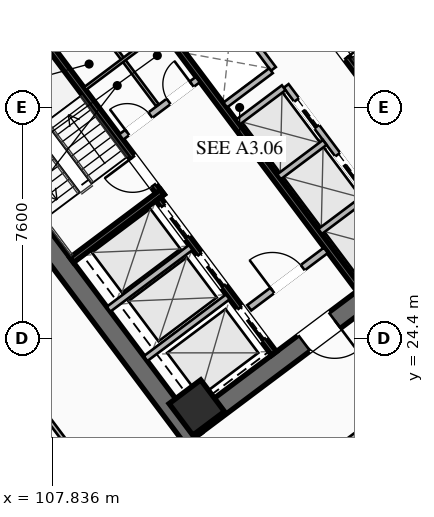
"""IFC4 building model, lengths in metres.
Left out: names, types, materials, properties, quantities, classifications, styles, units other than length and angle.
Written with IfcOpenShell. Run it as: python <this file> out.ifc"""

import sys

from ifc_helpers import new_model, si_unit, direction, frame, frame_2d, origin, origin_2d, place, context, subcontext, project, spatial, rectangle, hollow_rectangle, extrude, element, fill, save


model = new_model("IFC4")
c1 = context("Model", 3, precision=1e-05, world=origin(), true_north=direction((0.0, 1.0)))
c2 = subcontext(c1, "Body", "Model", "MODEL_VIEW")
j1 = project(units=[si_unit("LENGTHUNIT", "METRE"), si_unit("PLANEANGLEUNIT", "RADIAN")], contexts=[c1])
p1 = place(None, origin())
s1 = spatial("IfcSite", under=j1, at=p1, CompositionType="ELEMENT")
p2 = place(p1, origin())
s2 = spatial("IfcBuilding", under=s1, at=p2, CompositionType="ELEMENT")
p3 = place(p2, frame((0.0, 0.0, 31.7)))
s3 = spatial("IfcBuildingStorey", under=s2, at=p3, CompositionType="ELEMENT", Elevation=31.7)
for number, where, z_axis, x_axis in (
    (1, (112.476, 21.107, 0.0), (0.0, 0.0, 1.0), (-0.6, 0.8, 0.0)),
    (2, (115.524, 42.893, 0.0), (0.0, 0.0, 1.0), (0.6, -0.8, 0.0)),
):
    element("IfcWall", number, at=place(p3, frame(where, z_axis=z_axis, x_axis=x_axis)), inside=s3, PredefinedType="SHEAR", context=c2, shape_type="SweptSolid", body=[
        extrude(rectangle(XDim=15.6, YDim=0.65, at=frame_2d((7.8, 0.0))), origin(), (0.0, 0.0, 1.0), 3.55),
    ])
p4 = place(p3, frame((124.429, 30.478, 0.0), z_axis=(0.0, 0.0, 1.0), x_axis=(-0.799998028465, -0.600002628705, 0.0)))
e3 = element("IfcWall", 3, at=p4, inside=s3, PredefinedType="SHEAR", context=c2, shape_type="SweptSolid", body=[
    extrude(rectangle(XDim=14.86, YDim=0.65, at=frame_2d((7.43, 0.0))), origin(), (0.0, 0.0, 1.0), 3.55),
])
p5 = place(p4, frame((9.13, 0.0, 0.0)))
e4 = element("IfcOpeningElement", 4, at=p5, cuts=e3, PredefinedType="OPENING", context=c2, shape_type="SweptSolid", body=[
    extrude(rectangle(XDim=1.25, YDim=2.25, at=frame_2d((0.625, 1.125))), frame((0.0, 0.335, 0.0), z_axis=(0.0, -1.0, 0.0), x_axis=(1.0, 0.0, 0.0)), (0.0, 0.0, 1.0), 0.67),
])
p6 = place(p4, frame((4.08, 0.0, 0.0)))
e5 = element("IfcOpeningElement", 5, at=p6, cuts=e3, PredefinedType="OPENING", context=c2, shape_type="SweptSolid", body=[
    extrude(rectangle(XDim=1.25, YDim=2.25, at=frame_2d((0.625, 1.125))), frame((0.0, 0.335, 0.0), z_axis=(0.0, -1.0, 0.0), x_axis=(1.0, 0.0, 0.0)), (0.0, 0.0, 1.0), 0.67),
])
p7 = place(p3, frame((103.571, 33.522, 0.0), z_axis=(0.0, 0.0, 1.0), x_axis=(0.799998028465, 0.600002628705, 0.0)))
e6 = element("IfcWall", 6, at=p7, inside=s3, PredefinedType="SHEAR", context=c2, shape_type="SweptSolid", body=[
    extrude(rectangle(XDim=14.86, YDim=0.65, at=frame_2d((7.43, 0.0))), origin(), (0.0, 0.0, 1.0), 3.55),
])
p8 = place(p7, frame((4.48, 0.0, 0.0)))
e7 = element("IfcOpeningElement", 7, at=p8, cuts=e6, PredefinedType="OPENING", context=c2, shape_type="SweptSolid", body=[
    extrude(rectangle(XDim=1.25, YDim=2.25, at=frame_2d((0.625, 1.125))), frame((0.0, 0.335, 0.0), z_axis=(0.0, -1.0, 0.0), x_axis=(1.0, 0.0, 0.0)), (0.0, 0.0, 1.0), 0.67),
])
p9 = place(p7, frame((9.53, 0.0, 0.0)))
e8 = element("IfcOpeningElement", 8, at=p9, cuts=e6, PredefinedType="OPENING", context=c2, shape_type="SweptSolid", body=[
    extrude(rectangle(XDim=1.25, YDim=2.25, at=frame_2d((0.625, 1.125))), frame((0.0, 0.335, 0.0), z_axis=(0.0, -1.0, 0.0), x_axis=(1.0, 0.0, 0.0)), (0.0, 0.0, 1.0), 0.67),
])
p10 = place(p3, frame((112.59, 22.13, 0.0), z_axis=(0.0, 0.0, 1.0), x_axis=(0.799999996291, 0.600000004945, 0.0)))
e9 = element("IfcColumn", 9, at=p10, inside=s3, PredefinedType="COLUMN", context=c2, shape_type="SweptSolid", body=[
    extrude(hollow_rectangle(XDim=1.3, YDim=1.3, WallThickness=0.05, at=origin_2d()), origin(), (0.0, 0.0, 1.0), 3.35),
])
p11 = place(p3, frame((111.44, 29.08, 0.0), z_axis=(0.0, 0.0, 1.0), x_axis=(-0.600009827119, 0.799992629566, 0.0)))
e10 = element("IfcWall", 10, at=p11, inside=s3, PredefinedType="SHEAR", context=c2, shape_type="SweptSolid", body=[
    extrude(rectangle(XDim=7.95, YDim=0.2, at=frame_2d((3.975, 0.0))), origin(), (0.0, 0.0, 1.0), 3.35),
])
p12 = place(p11, frame((0.45, 0.0, 0.0)))
e11 = element("IfcOpeningElement", 11, at=p12, cuts=e10, PredefinedType="OPENING", context=c2, shape_type="SweptSolid", body=[
    extrude(rectangle(XDim=1.15, YDim=2.2, at=frame_2d((0.575, 1.1))), frame((0.0, 0.11, 0.0), z_axis=(0.0, -1.0, 0.0), x_axis=(1.0, 0.0, 0.0)), (0.0, 0.0, 1.0), 0.22),
])
p13 = place(p3, frame((108.476, 26.982, 0.0), z_axis=(0.0, 0.0, 1.0), x_axis=(0.799984290658, 0.600020945218, 0.0)))
e12 = element("IfcWall", 12, at=p13, inside=s3, PredefinedType="SHEAR", context=c2, shape_type="SweptSolid", body=[
    extrude(rectangle(XDim=3.73, YDim=0.2, at=frame_2d((1.865, 0.0))), origin(), (0.0, 0.0, 1.0), 3.35),
])
p14 = place(p3, frame((116.56, 34.92, 0.0), z_axis=(0.0, 0.0, 1.0), x_axis=(0.600009827119, -0.799992629566, 0.0)))
e13 = element("IfcWall", 13, at=p14, inside=s3, PredefinedType="SHEAR", context=c2, shape_type="SweptSolid", body=[
    extrude(rectangle(XDim=7.95, YDim=0.2, at=frame_2d((3.975, 0.0))), origin(), (0.0, 0.0, 1.0), 3.35),
])
p15 = place(p14, frame((0.45, 0.0, 0.0)))
e14 = element("IfcOpeningElement", 14, at=p15, cuts=e13, PredefinedType="OPENING", context=c2, shape_type="SweptSolid", body=[
    extrude(rectangle(XDim=1.15, YDim=2.2, at=frame_2d((0.575, 1.1))), frame((0.0, 0.11, 0.0), z_axis=(0.0, -1.0, 0.0), x_axis=(1.0, 0.0, 0.0)), (0.0, 0.0, 1.0), 0.22),
])
p16 = place(p3, frame((117.938, 26.016, 0.0), z_axis=(0.0, 0.0, 1.0), x_axis=(-0.600005463273, 0.799995902516, 0.0)))
e15 = element("IfcWall", 15, at=p16, inside=s3, PredefinedType="SHEAR", context=c2, shape_type="SweptSolid", body=[
    extrude(rectangle(XDim=14.3, YDim=0.2, at=frame_2d((7.15, 0.0))), origin(), (0.0, 0.0, 1.0), 3.35),
])
p17 = place(p3, frame((110.104, 31.028, 0.0), z_axis=(0.0, 0.0, 1.0), x_axis=(0.800018601094, 0.59997519774, 0.0)))
e16 = element("IfcWall", 16, at=p17, inside=s3, PredefinedType="SOLIDWALL", context=c2, shape_type="SweptSolid", body=[
    extrude(rectangle(XDim=3.15, YDim=0.22, at=frame_2d((1.575, 0.0))), origin(), (0.0, 0.0, 1.0), 2.703),
])
p18 = place(p17, frame((0.25, 0.0, 0.0)))
e17 = element("IfcOpeningElement", 17, at=p18, cuts=e16, PredefinedType="OPENING", context=c2, shape_type="SweptSolid", body=[
    extrude(rectangle(XDim=0.95, YDim=2.05, at=frame_2d((0.475, 1.025))), frame((0.0, 0.12, 0.0), z_axis=(0.0, -1.0, 0.0), x_axis=(1.0, 0.0, 0.0)), (0.0, 0.0, 1.0), 0.24),
])
p19 = place(p17, frame((1.95, 0.0, 0.0)))
e18 = element("IfcOpeningElement", 18, at=p19, cuts=e16, PredefinedType="OPENING", context=c2, shape_type="SweptSolid", body=[
    extrude(rectangle(XDim=0.95, YDim=2.05, at=frame_2d((0.475, 1.025))), frame((0.0, 0.12, 0.0), z_axis=(0.0, -1.0, 0.0), x_axis=(1.0, 0.0, 0.0)), (0.0, 0.0, 1.0), 0.24),
])
p20 = place(p3, frame((114.316, 25.412, 0.0), z_axis=(0.0, 0.0, 1.0), x_axis=(0.800018601094, 0.59997519774, 0.0)))
e19 = element("IfcWall", 19, at=p20, inside=s3, PredefinedType="SOLIDWALL", context=c2, shape_type="SweptSolid", body=[
    extrude(rectangle(XDim=3.15, YDim=0.22, at=frame_2d((1.575, 0.0))), origin(), (0.0, 0.0, 1.0), 2.703),
])
p21 = place(p20, frame((0.95, 0.0, 0.0)))
e20 = element("IfcOpeningElement", 20, at=p21, cuts=e19, PredefinedType="OPENING", context=c2, shape_type="SweptSolid", body=[
    extrude(rectangle(XDim=1.25, YDim=2.25, at=frame_2d((0.625, 1.125))), frame((0.0, 0.12, 0.0), z_axis=(0.0, -1.0, 0.0), x_axis=(1.0, 0.0, 0.0)), (0.0, 0.0, 1.0), 0.24),
])
p22 = place(p3, frame((115.13, 23.91, 0.0), z_axis=(0.0, 0.0, 1.0), x_axis=(-0.599975393228, 0.800018454488, 0.0)))
e21 = element("IfcWall", 21, at=p22, inside=s3, PredefinedType="SHEAR", context=c2, shape_type="SweptSolid", body=[
    extrude(rectangle(XDim=6.35, YDim=0.2, at=frame_2d((3.175, 0.0))), origin(), (0.0, 0.0, 1.0), 3.35),
])
p23 = place(p22, frame((4.775, 0.0, 0.0)))
e22 = element("IfcOpeningElement", 22, at=p23, cuts=e21, PredefinedType="OPENING", context=c2, shape_type="SweptSolid", body=[
    extrude(rectangle(XDim=1.3, YDim=2.25, at=frame_2d((0.65, 1.125))), frame((0.0, 0.11, 0.0), z_axis=(0.0, -1.0, 0.0), x_axis=(1.0, 0.0, 0.0)), (0.0, 0.0, 1.0), 0.22),
])
p24 = place(p22, frame((2.775, 0.0, 0.0)))
e23 = element("IfcOpeningElement", 23, at=p24, cuts=e21, PredefinedType="OPENING", context=c2, shape_type="SweptSolid", body=[
    extrude(rectangle(XDim=1.3, YDim=2.25, at=frame_2d((0.65, 1.125))), frame((0.0, 0.11, 0.0), z_axis=(0.0, -1.0, 0.0), x_axis=(1.0, 0.0, 0.0)), (0.0, 0.0, 1.0), 0.22),
])
p25 = place(p22, frame((0.575, 0.0, 0.0)))
e24 = element("IfcOpeningElement", 24, at=p25, cuts=e21, PredefinedType="OPENING", context=c2, shape_type="SweptSolid", body=[
    extrude(rectangle(XDim=1.3, YDim=2.25, at=frame_2d((0.65, 1.125))), frame((0.0, 0.11, 0.0), z_axis=(0.0, -1.0, 0.0), x_axis=(1.0, 0.0, 0.0)), (0.0, 0.0, 1.0), 0.22),
])
for number, where, z_axis, x_axis in (
    (25, (110.906, 23.742, 0.0), (0.0, 0.0, 1.0), (0.8, 0.6, 0.0)),
    (26, (109.688, 25.366, 0.0), (0.0, 0.0, 1.0), (0.8, 0.6, 0.0)),
):
    element("IfcWall", number, at=place(p3, frame(where, z_axis=z_axis, x_axis=x_axis)), inside=s3, PredefinedType="SOLIDWALL", context=c2, shape_type="SweptSolid", body=[
        extrude(rectangle(XDim=3.38, YDim=0.2, at=frame_2d((1.69, 0.0))), origin(), (0.0, 0.0, 1.0), 3.35),
    ])
p26 = place(p3, frame((111.296, 32.072, 0.0), z_axis=(0.0, 0.0, 1.0), x_axis=(-0.59995887973, 0.800030838552, 0.0)))
e27 = element("IfcWall", 27, at=p26, inside=s3, PredefinedType="PARTITIONING", context=c2, shape_type="SweptSolid", body=[
    extrude(rectangle(XDim=3.8, YDim=0.11, at=frame_2d((1.9, 0.0))), origin(), (0.0, 0.0, 1.0), 2.703),
])
p27 = place(p3, frame((108.91, 32.62, 0.0), z_axis=(0.0, 0.0, 1.0), x_axis=(0.800018601094, 0.59997519774, 0.0)))
e28 = element("IfcWall", 28, at=p27, inside=s3, PredefinedType="PARTITIONING", context=c2, shape_type="SweptSolid", body=[
    extrude(rectangle(XDim=3.15, YDim=0.11, at=frame_2d((1.575, 0.0))), origin(), (0.0, 0.0, 1.0), 2.703),
])
p28 = place(p3, frame((119.61, 27.27, 0.0), z_axis=(0.0, 0.0, 1.0), x_axis=(-0.600011488909, 0.79999138319, 0.0)))
e29 = element("IfcWall", 29, at=p28, inside=s3, PredefinedType="SOLIDWALL", context=c2, shape_type="SweptSolid", body=[
    extrude(rectangle(XDim=6.8, YDim=0.2, at=frame_2d((3.4, 0.0))), origin(), (0.0, 0.0, 1.0), 3.35),
])
p29 = place(p28, frame((0.625, 0.0, 0.0)))
e30 = element("IfcOpeningElement", 30, at=p29, cuts=e29, PredefinedType="OPENING", context=c2, shape_type="SweptSolid", body=[
    extrude(rectangle(XDim=1.1, YDim=2.2, at=frame_2d((0.55, 1.1))), frame((0.0, 0.11, 0.0), z_axis=(0.0, -1.0, 0.0), x_axis=(1.0, 0.0, 0.0)), (0.0, 0.0, 1.0), 0.22),
])
p30 = place(p28, frame((2.875, 0.0, 0.0)))
e31 = element("IfcOpeningElement", 31, at=p30, cuts=e29, PredefinedType="OPENING", context=c2, shape_type="SweptSolid", body=[
    extrude(rectangle(XDim=1.1, YDim=2.2, at=frame_2d((0.55, 1.1))), frame((0.0, 0.11, 0.0), z_axis=(0.0, -1.0, 0.0), x_axis=(1.0, 0.0, 0.0)), (0.0, 0.0, 1.0), 0.22),
])
p31 = place(p28, frame((5.125, 0.0, 0.0)))
e32 = element("IfcOpeningElement", 32, at=p31, cuts=e29, PredefinedType="OPENING", context=c2, shape_type="SweptSolid", body=[
    extrude(rectangle(XDim=1.1, YDim=2.2, at=frame_2d((0.55, 1.1))), frame((0.0, 0.11, 0.0), z_axis=(0.0, -1.0, 0.0), x_axis=(1.0, 0.0, 0.0)), (0.0, 0.0, 1.0), 0.22),
])
p32 = place(p3, frame((116.646, 27.922, 0.0), z_axis=(0.0, 0.0, 1.0), x_axis=(0.8, 0.6, 0.0)))
e33 = element("IfcWall", 33, at=p32, inside=s3, PredefinedType="SOLIDWALL", context=c2, shape_type="SweptSolid", body=[
    extrude(rectangle(XDim=1.88, YDim=0.2, at=frame_2d((0.94, 0.0))), origin(), (0.0, 0.0, 1.0), 3.35),
])
p33 = place(p3, frame((115.296, 29.722, 0.0), z_axis=(0.0, 0.0, 1.0), x_axis=(0.799984418148, 0.600020775241, 0.0)))
e34 = element("IfcWall", 34, at=p33, inside=s3, PredefinedType="SOLIDWALL", context=c2, shape_type="SweptSolid", body=[
    extrude(rectangle(XDim=1.88, YDim=0.2, at=frame_2d((0.94, 0.0))), origin(), (0.0, 0.0, 1.0), 3.35),
])
p34 = place(p3, frame((113.946, 31.522, 0.0), z_axis=(0.0, 0.0, 1.0), x_axis=(0.8, 0.6, 0.0)))
e35 = element("IfcWall", 35, at=p34, inside=s3, PredefinedType="SOLIDWALL", context=c2, shape_type="SweptSolid", body=[
    extrude(rectangle(XDim=1.88, YDim=0.2, at=frame_2d((0.94, 0.0))), origin(), (0.0, 0.0, 1.0), 3.35),
])
p35 = place(p3, frame((115.11, 33.27, 0.0), z_axis=(0.0, 0.0, 1.0), x_axis=(-0.600011488909, 0.79999138319, 0.0)))
e36 = element("IfcWall", 36, at=p35, inside=s3, PredefinedType="SOLIDWALL", context=c2, shape_type="SweptSolid", body=[
    extrude(rectangle(XDim=6.8, YDim=0.2, at=frame_2d((3.4, 0.0))), origin(), (0.0, 0.0, 1.0), 3.35),
])
p36 = place(p3, frame((113.526, 32.082, 0.0), z_axis=(0.0, 0.0, 1.0), x_axis=(0.800046745961, 0.599937666993, 0.0)))
e37 = element("IfcWall", 37, at=p36, inside=s3, PredefinedType="SOLIDWALL", context=c2, shape_type="SweptSolid", body=[
    extrude(rectangle(XDim=1.88, YDim=0.2, at=frame_2d((0.94, 0.0))), origin(), (0.0, 0.0, 1.0), 3.35),
])
p37 = place(p3, frame((112.176, 33.882, 0.0), z_axis=(0.0, 0.0, 1.0), x_axis=(0.8, 0.6, 0.0)))
e38 = element("IfcWall", 38, at=p37, inside=s3, PredefinedType="SOLIDWALL", context=c2, shape_type="SweptSolid", body=[
    extrude(rectangle(XDim=1.88, YDim=0.2, at=frame_2d((0.94, 0.0))), origin(), (0.0, 0.0, 1.0), 3.35),
])
p38 = place(p3, frame((135.46, 34.47, 0.0), z_axis=(0.0, 0.0, 1.0), x_axis=(-0.800000982127, -0.599998690494, 0.0)))
e39 = element("IfcWall", 39, at=p38, inside=s3, PredefinedType="PARTITIONING", context=c2, shape_type="SweptSolid", body=[
    extrude(rectangle(XDim=29.83, YDim=0.135, at=frame_2d((14.915, 0.0))), origin(), (0.0, 0.0, 1.0), 2.703),
])
p39 = place(p38, frame((28.5, 0.0, 0.0)))
e40 = element("IfcOpeningElement", 40, at=p39, cuts=e39, PredefinedType="OPENING", context=c2, shape_type="SweptSolid", body=[
    extrude(rectangle(XDim=0.95, YDim=2.05, at=frame_2d((0.475, 1.025))), frame((0.0, 0.077, 0.0), z_axis=(0.0, -1.0, 0.0), x_axis=(1.0, 0.0, 0.0)), (0.0, 0.0, 1.0), 0.155),
])
p40 = place(p38, frame((18.075, 0.0, 0.0)))
e41 = element("IfcOpeningElement", 41, at=p40, cuts=e39, PredefinedType="OPENING", context=c2, shape_type="SweptSolid", body=[
    extrude(rectangle(XDim=0.95, YDim=2.05, at=frame_2d((0.475, 1.025))), frame((0.0, 0.077, 0.0), z_axis=(0.0, -1.0, 0.0), x_axis=(1.0, 0.0, 0.0)), (0.0, 0.0, 1.0), 0.155),
])
p41 = place(p38, frame((0.38, 0.0, 0.0)))
e42 = element("IfcOpeningElement", 42, at=p41, cuts=e39, PredefinedType="OPENING", context=c2, shape_type="SweptSolid", body=[
    extrude(rectangle(XDim=0.95, YDim=2.05, at=frame_2d((0.475, 1.025))), frame((0.0, 0.077, 0.0), z_axis=(0.0, -1.0, 0.0), x_axis=(1.0, 0.0, 0.0)), (0.0, 0.0, 1.0), 0.155),
])
p42 = place(p3, frame((111.548, 16.636, 0.0), z_axis=(0.0, 0.0, 1.0), x_axis=(-0.600003610192, 0.799997292343, 0.0)))
e43 = element("IfcWall", 43, at=p42, inside=s3, PredefinedType="PARTITIONING", context=c2, shape_type="SweptSolid", body=[
    extrude(rectangle(XDim=21.64, YDim=0.135, at=frame_2d((10.82, 0.0))), origin(), (0.0, 0.0, 1.0), 2.703),
])
p43 = place(p42, frame((0.3, 0.0, 0.0)))
e44 = element("IfcOpeningElement", 44, at=p43, cuts=e43, PredefinedType="OPENING", context=c2, shape_type="SweptSolid", body=[
    extrude(rectangle(XDim=0.95, YDim=2.05, at=frame_2d((0.475, 1.025))), frame((0.0, 0.077, 0.0), z_axis=(0.0, -1.0, 0.0), x_axis=(1.0, 0.0, 0.0)), (0.0, 0.0, 1.0), 0.155),
])
p44 = place(p5, origin())
e45 = element("IfcDoor", 45, at=p44, inside=s3, OperationType="SINGLE_SWING_LEFT", PredefinedType="DOOR", context=c2, shape_type="SweptSolid", body=[
    extrude(rectangle(XDim=1.25, YDim=2.25, at=frame_2d((0.625, 1.125))), frame((0.0, 0.025, 0.0), z_axis=(0.0, -1.0, 0.0), x_axis=(1.0, 0.0, 0.0)), (0.0, 0.0, 1.0), 0.05),
])
fill(e4, e45)
p45 = place(p12, origin())
e46 = element("IfcDoor", 46, at=p45, inside=s3, OperationType="SINGLE_SWING_RIGHT", PredefinedType="DOOR", context=c2, shape_type="SweptSolid", body=[
    extrude(rectangle(XDim=1.15, YDim=2.2, at=frame_2d((0.575, 1.1))), frame((0.0, 0.025, 0.0), z_axis=(0.0, -1.0, 0.0), x_axis=(1.0, 0.0, 0.0)), (0.0, 0.0, 1.0), 0.05),
])
fill(e11, e46)
p46 = place(p15, origin())
e47 = element("IfcDoor", 47, at=p46, inside=s3, OperationType="SINGLE_SWING_RIGHT", PredefinedType="DOOR", context=c2, shape_type="SweptSolid", body=[
    extrude(rectangle(XDim=1.15, YDim=2.2, at=frame_2d((0.575, 1.1))), frame((0.0, 0.025, 0.0), z_axis=(0.0, -1.0, 0.0), x_axis=(1.0, 0.0, 0.0)), (0.0, 0.0, 1.0), 0.05),
])
fill(e14, e47)
p47 = place(p21, origin())
e48 = element("IfcDoor", 48, at=p47, inside=s3, OperationType="SINGLE_SWING_LEFT", PredefinedType="DOOR", context=c2, shape_type="SweptSolid", body=[
    extrude(rectangle(XDim=1.25, YDim=2.25, at=frame_2d((0.625, 1.125))), frame((0.0, 0.025, 0.0), z_axis=(0.0, -1.0, 0.0), x_axis=(1.0, 0.0, 0.0)), (0.0, 0.0, 1.0), 0.05),
])
fill(e20, e48)
p48 = place(p18, origin())
e49 = element("IfcDoor", 49, at=p48, inside=s3, OperationType="SINGLE_SWING_LEFT", PredefinedType="DOOR", context=c2, shape_type="SweptSolid", body=[
    extrude(rectangle(XDim=0.95, YDim=2.05, at=frame_2d((0.475, 1.025))), frame((0.0, 0.025, 0.0), z_axis=(0.0, -1.0, 0.0), x_axis=(1.0, 0.0, 0.0)), (0.0, 0.0, 1.0), 0.05),
])
fill(e17, e49)
p49 = place(p19, origin())
e50 = element("IfcDoor", 50, at=p49, inside=s3, OperationType="SINGLE_SWING_RIGHT", PredefinedType="DOOR", context=c2, shape_type="SweptSolid", body=[
    extrude(rectangle(XDim=0.95, YDim=2.05, at=frame_2d((0.475, 1.025))), frame((0.0, 0.025, 0.0), z_axis=(0.0, -1.0, 0.0), x_axis=(1.0, 0.0, 0.0)), (0.0, 0.0, 1.0), 0.05),
])
fill(e18, e50)
p50 = place(p23, origin())
e51 = element("IfcDoor", 51, at=p50, inside=s3, OperationType="SLIDING_TO_LEFT", PredefinedType="DOOR", context=c2, shape_type="SweptSolid", body=[
    extrude(rectangle(XDim=1.3, YDim=2.25, at=frame_2d((0.65, 1.125))), frame((0.0, 0.025, 0.0), z_axis=(0.0, -1.0, 0.0), x_axis=(1.0, 0.0, 0.0)), (0.0, 0.0, 1.0), 0.05),
])
fill(e22, e51)
p51 = place(p24, origin())
e52 = element("IfcDoor", 52, at=p51, inside=s3, OperationType="SLIDING_TO_LEFT", PredefinedType="DOOR", context=c2, shape_type="SweptSolid", body=[
    extrude(rectangle(XDim=1.3, YDim=2.25, at=frame_2d((0.65, 1.125))), frame((0.0, 0.025, 0.0), z_axis=(0.0, -1.0, 0.0), x_axis=(1.0, 0.0, 0.0)), (0.0, 0.0, 1.0), 0.05),
])
fill(e23, e52)
p52 = place(p25, origin())
e53 = element("IfcDoor", 53, at=p52, inside=s3, OperationType="SLIDING_TO_LEFT", PredefinedType="DOOR", context=c2, shape_type="SweptSolid", body=[
    extrude(rectangle(XDim=1.3, YDim=2.25, at=frame_2d((0.65, 1.125))), frame((0.0, 0.025, 0.0), z_axis=(0.0, -1.0, 0.0), x_axis=(1.0, 0.0, 0.0)), (0.0, 0.0, 1.0), 0.05),
])
fill(e24, e53)
p53 = place(p30, origin())
e54 = element("IfcDoor", 54, at=p53, inside=s3, OperationType="SLIDING_TO_LEFT", PredefinedType="DOOR", context=c2, shape_type="SweptSolid", body=[
    extrude(rectangle(XDim=1.1, YDim=2.2, at=frame_2d((0.55, 1.1))), frame((0.0, 0.025, 0.0), z_axis=(0.0, -1.0, 0.0), x_axis=(1.0, 0.0, 0.0)), (0.0, 0.0, 1.0), 0.05),
])
fill(e31, e54)
p54 = place(p31, origin())
e55 = element("IfcDoor", 55, at=p54, inside=s3, OperationType="SLIDING_TO_LEFT", PredefinedType="DOOR", context=c2, shape_type="SweptSolid", body=[
    extrude(rectangle(XDim=1.1, YDim=2.2, at=frame_2d((0.55, 1.1))), frame((0.0, 0.025, 0.0), z_axis=(0.0, -1.0, 0.0), x_axis=(1.0, 0.0, 0.0)), (0.0, 0.0, 1.0), 0.05),
])
fill(e32, e55)
save(model, sys.argv[1])
